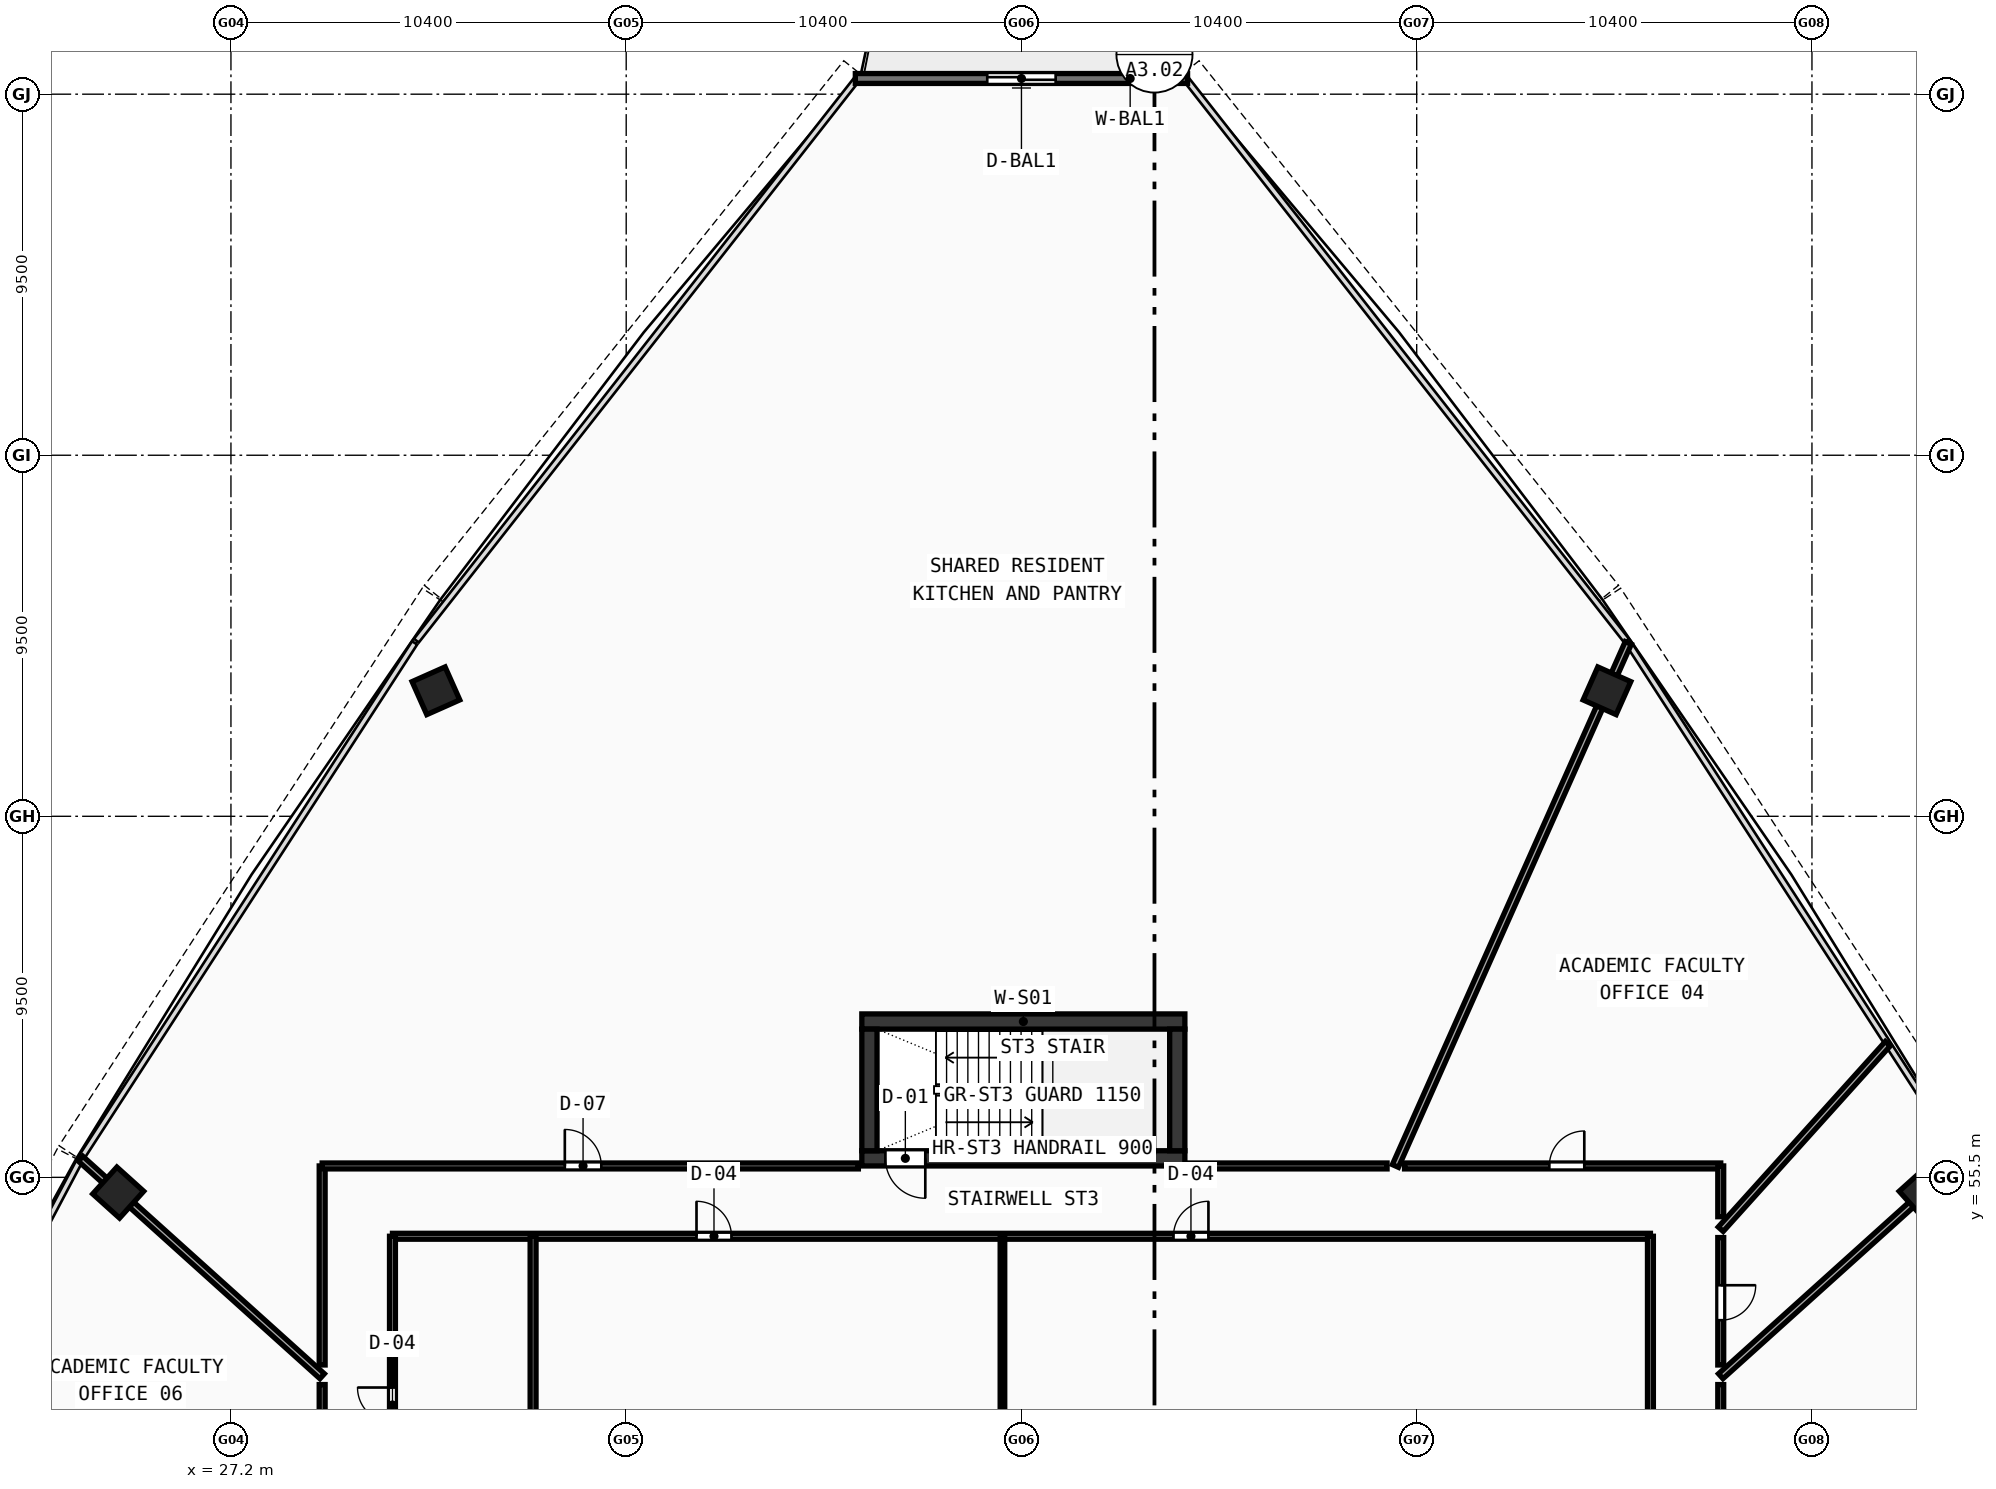
"""IFC4 building model, lengths in metres.
Left out: names, types, materials, properties, quantities, classifications, styles, units other than length and angle.
Written with IfcOpenShell. Run it as: python <this file> out.ifc"""

import sys

from ifc_helpers import new_model, si_unit, direction, frame, frame_2d, origin, origin_with_axes, origin_2d, place, context, subcontext, project, spatial, rectangle, hollow_rectangle, extrude, source, transform, mapped, element, fill, save


model = new_model("IFC4")
c1 = context("Model", 3, precision=1e-05, world=origin(), true_north=direction((0.0, 1.0)))
c2 = subcontext(c1, "Body", "Model", "MODEL_VIEW")
j1 = project(units=[si_unit("LENGTHUNIT", "METRE"), si_unit("PLANEANGLEUNIT", "RADIAN")], contexts=[c1])
p1 = place(None, origin())
s1 = spatial("IfcSite", under=j1, at=p1, CompositionType="ELEMENT")
p2 = place(p1, origin())
s2 = spatial("IfcBuilding", under=s1, at=p2, CompositionType="ELEMENT")
p3 = place(p2, frame((0.0, 0.0, 151.91)))
s3 = spatial("IfcBuildingStorey", under=s2, at=p3, CompositionType="ELEMENT", Elevation=151.91)
p4 = place(p3, frame((43.8, 59.6, 0.0), z_axis=(0.0, 0.0, 1.0), x_axis=(1.0, 0.0, 0.0)))
e1 = element("IfcWall", 1, at=p4, inside=s3, PredefinedType="SHEAR", context=c2, shape_type="SweptSolid", body=[
    extrude(rectangle(XDim=8.5, YDim=0.4, at=frame_2d((4.25, 0.0))), origin(), (0.0, 0.0, 1.0), 3.42),
])
p5 = place(p3, frame((43.8, 56.0, 0.0), z_axis=(0.0, 0.0, 1.0), x_axis=(1.0, 0.0, 0.0)))
e2 = element("IfcWall", 2, at=p5, inside=s3, PredefinedType="SHEAR", context=c2, shape_type="SweptSolid", body=[
    extrude(rectangle(XDim=8.5, YDim=0.4, at=frame_2d((4.25, 0.0))), origin(), (0.0, 0.0, 1.0), 3.42),
])
p6 = place(p5, frame((0.62, 0.0, 0.0)))
e3 = element("IfcOpeningElement", 3, at=p6, cuts=e2, PredefinedType="OPENING", context=c2, shape_type="SweptSolid", body=[
    extrude(rectangle(XDim=1.05, YDim=2.1, at=frame_2d((0.525, 1.05))), frame((0.0, 0.21, 0.0), z_axis=(0.0, -1.0, 0.0), x_axis=(1.0, 0.0, 0.0)), (0.0, 0.0, 1.0), 0.42),
])
for number, where, z_axis, x_axis in (
    (4, (44.0, 56.2, 0.0), (0.0, 0.0, 1.0), (0.0, 1.0, 0.0)),
    (5, (52.1, 56.2, 0.0), (0.0, 0.0, 1.0), (0.0, 1.0, 0.0)),
):
    element("IfcWall", number, at=place(p3, frame(where, z_axis=z_axis, x_axis=x_axis)), inside=s3, PredefinedType="SHEAR", context=c2, shape_type="SweptSolid", body=[
        extrude(rectangle(XDim=3.2, YDim=0.4, at=frame_2d((1.6, 0.0))), origin(), (0.0, 0.0, 1.0), 3.42),
    ])
m1 = source(origin(), c2, "Body", "SweptSolid", [
    extrude(hollow_rectangle(XDim=0.95, YDim=0.95, WallThickness=0.04, at=origin_2d()), origin(), (0.0, 0.0, 1.0), 3.68),
])
for number, where, z_axis, x_axis in (
    (6, (71.766, 55.099, -0.26), (0.0, 0.0, 1.0), (-0.669, 0.743, 0.0)),
    (7, (63.406, 68.303, -0.26), (0.0, 0.0, 1.0), (-0.914, 0.407, 0.0)),
    (8, (32.594, 68.303, -0.26), (0.0, 0.0, 1.0), (-0.914, -0.407, 0.0)),
    (9, (24.234, 55.099, -0.26), (0.0, 0.0, 1.0), (-0.669, -0.743, 0.0)),
):
    element("IfcColumn", number, at=place(p3, frame(where, z_axis=z_axis, x_axis=x_axis)), inside=s3, PredefinedType="COLUMN", context=c2, shape_type="MappedRepresentation", body=[
        mapped(m1, transform((0.0, 0.0, 0.0), scale=1.0)),
    ])
p7 = place(p3, frame((52.371, 84.413, 0.0), z_axis=(0.0, 0.0, 1.0), x_axis=(-1.0, 0.0, 0.0)))
e10 = element("IfcWall", 10, at=p7, inside=s3, PredefinedType="STANDARD", context=c2, shape_type="SweptSolid", body=[
    extrude(rectangle(XDim=8.742, YDim=0.26, at=frame_2d((4.371, 0.0))), origin(), (0.0, 0.0, 1.0), 3.42),
])
p8 = place(p7, frame((3.471, 0.0, 0.0)))
e11 = element("IfcOpeningElement", 11, at=p8, cuts=e10, PredefinedType="OPENING", context=c2, shape_type="SweptSolid", body=[
    extrude(rectangle(XDim=1.8, YDim=2.15, at=frame_2d((0.9, 1.075))), frame((0.0, 0.14, 0.0), z_axis=(0.0, -1.0, 0.0), x_axis=(1.0, 0.0, 0.0)), (0.0, 0.0, 1.0), 0.28),
])
p9 = place(p3, frame((31.45, 53.95, 0.0), z_axis=(0.0, 0.0, 1.0), x_axis=(1.0, 0.0, 0.0)))
e12 = element("IfcWall", 12, at=p9, inside=s3, PredefinedType="PARTITIONING", context=c2, shape_type="SweptSolid", body=[
    extrude(rectangle(XDim=33.1, YDim=0.155, at=frame_2d((16.55, 0.0))), origin(), (0.0, 0.0, 1.0), 2.77),
])
p10 = place(p9, frame((8.0, 0.0, 0.0)))
e13 = element("IfcOpeningElement", 13, at=p10, cuts=e12, PredefinedType="OPENING", context=c2, shape_type="SweptSolid", body=[
    extrude(rectangle(XDim=0.92, YDim=2.1, at=frame_2d((0.46, 1.05))), frame((0.0, 0.087, 0.0), z_axis=(0.0, -1.0, 0.0), x_axis=(1.0, 0.0, 0.0)), (0.0, 0.0, 1.0), 0.175),
])
p11 = place(p9, frame((20.55, 0.0, 0.0)))
e14 = element("IfcOpeningElement", 14, at=p11, cuts=e12, PredefinedType="OPENING", context=c2, shape_type="SweptSolid", body=[
    extrude(rectangle(XDim=0.92, YDim=2.1, at=frame_2d((0.46, 1.05))), frame((0.0, 0.087, 0.0), z_axis=(0.0, -1.0, 0.0), x_axis=(1.0, 0.0, 0.0)), (0.0, 0.0, 1.0), 0.175),
])
p12 = place(p3, frame((31.45, 42.25, 0.0), z_axis=(0.0, 0.0, 1.0), x_axis=(0.0, 1.0, 0.0)))
e15 = element("IfcWall", 15, at=p12, inside=s3, PredefinedType="PARTITIONING", context=c2, shape_type="SweptSolid", body=[
    extrude(rectangle(XDim=11.7, YDim=0.155, at=frame_2d((5.85, 0.0))), origin(), (0.0, 0.0, 1.0), 2.77),
])
p13 = place(p12, frame((1.4, 0.0, 0.0)))
e16 = element("IfcOpeningElement", 16, at=p13, cuts=e15, PredefinedType="OPENING", context=c2, shape_type="SweptSolid", body=[
    extrude(rectangle(XDim=0.94, YDim=2.1, at=frame_2d((0.47, 1.05))), frame((0.0, 0.087, 0.0), z_axis=(0.0, -1.0, 0.0), x_axis=(1.0, 0.0, 0.0)), (0.0, 0.0, 1.0), 0.175),
])
p14 = place(p12, frame((6.8, 0.0, 0.0)))
e17 = element("IfcOpeningElement", 17, at=p14, cuts=e15, PredefinedType="OPENING", context=c2, shape_type="SweptSolid", body=[
    extrude(rectangle(XDim=0.92, YDim=2.1, at=frame_2d((0.46, 1.05))), frame((0.0, 0.087, 0.0), z_axis=(0.0, -1.0, 0.0), x_axis=(1.0, 0.0, 0.0)), (0.0, 0.0, 1.0), 0.175),
])
for number, where, z_axis, x_axis in (
    (18, (64.55, 42.25, 0.0), (0.0, 0.0, 1.0), (0.0, 1.0, 0.0)),
    (19, (35.15, 42.25, 0.0), (0.0, 0.0, 1.0), (0.0, 1.0, 0.0)),
):
    element("IfcWall", number, at=place(p3, frame(where, z_axis=z_axis, x_axis=x_axis)), inside=s3, PredefinedType="PARTITIONING", context=c2, shape_type="SweptSolid", body=[
        extrude(rectangle(XDim=11.7, YDim=0.155, at=frame_2d((5.85, 0.0))), origin(), (0.0, 0.0, 1.0), 2.77),
    ])
p15 = place(p3, frame((47.5, 42.25, 0.0), z_axis=(0.0, 0.0, 1.0), x_axis=(0.0, 1.0, 0.0)))
e20 = element("IfcWall", 20, at=p15, inside=s3, PredefinedType="PARTITIONING", context=c2, shape_type="SweptSolid", body=[
    extrude(rectangle(XDim=11.7, YDim=0.12, at=frame_2d((5.85, 0.0))), origin(), (0.0, 0.0, 1.0), 3.02),
])
p16 = place(p3, frame((66.4, 50.267, 0.0), z_axis=(0.0, 0.0, 1.0), x_axis=(0.743147926867, 0.669127161901, 0.0)))
e21 = element("IfcWall", 21, at=p16, inside=s3, PredefinedType="PARTITIONING", context=c2, shape_type="SweptSolid", body=[
    extrude(rectangle(XDim=8.552, YDim=0.175, at=frame_2d((4.276, 0.0))), origin(), (0.0, 0.0, 1.0), 2.77),
])
p17 = place(p3, frame((66.4, 54.135, 0.0), z_axis=(0.0, 0.0, 1.0), x_axis=(0.669139250318, 0.74313704233, 0.0)))
e22 = element("IfcWall", 22, at=p17, inside=s3, PredefinedType="PARTITIONING", context=c2, shape_type="SweptSolid", body=[
    extrude(rectangle(XDim=6.569, YDim=0.175, at=frame_2d((3.284, 0.0))), origin(), (0.0, 0.0, 1.0), 2.77),
])
p18 = place(p3, frame((57.84, 55.8, 0.0), z_axis=(0.0, 0.0, 1.0), x_axis=(0.406736829456, 0.913545374661, 0.0)))
e23 = element("IfcWall", 23, at=p18, inside=s3, PredefinedType="PARTITIONING", context=c2, shape_type="SweptSolid", body=[
    extrude(rectangle(XDim=15.065, YDim=0.175, at=frame_2d((7.532, 0.0))), origin(), (0.0, 0.0, 1.0), 2.77),
])
p19 = place(p3, frame((29.6, 50.267, 0.0), z_axis=(0.0, 0.0, 1.0), x_axis=(-0.743147926867, 0.669127161901, 0.0)))
e24 = element("IfcWall", 24, at=p19, inside=s3, PredefinedType="PARTITIONING", context=c2, shape_type="SweptSolid", body=[
    extrude(rectangle(XDim=8.552, YDim=0.175, at=frame_2d((4.276, 0.0))), origin(), (0.0, 0.0, 1.0), 2.77),
])
p20 = place(p3, frame((29.6, 43.733, 0.0), z_axis=(0.0, 0.0, 1.0), x_axis=(0.0, 1.0, 0.0)))
e25 = element("IfcWall", 25, at=p20, inside=s3, PredefinedType="PARTITIONING", context=c2, shape_type="SweptSolid", body=[
    extrude(rectangle(XDim=6.315, YDim=0.155, at=frame_2d((3.157, 0.0))), origin(), (0.0, 0.0, 1.0), 2.77),
])
p21 = place(p20, frame((2.683, 0.0, 0.0)))
e26 = element("IfcOpeningElement", 26, at=p21, cuts=e25, PredefinedType="OPENING", context=c2, shape_type="SweptSolid", body=[
    extrude(rectangle(XDim=0.92, YDim=2.1, at=frame_2d((0.46, 1.05))), frame((0.0, 0.087, 0.0), z_axis=(0.0, -1.0, 0.0), x_axis=(1.0, 0.0, 0.0)), (0.0, 0.0, 1.0), 0.175),
])
p22 = place(p3, frame((29.6, 50.563, 0.0), z_axis=(0.0, 0.0, 1.0), x_axis=(0.0, 1.0, 0.0)))
e27 = element("IfcWall", 27, at=p22, inside=s3, PredefinedType="PARTITIONING", context=c2, shape_type="SweptSolid", body=[
    extrude(rectangle(XDim=5.237, YDim=0.155, at=frame_2d((2.618, 0.0))), origin(), (0.0, 0.0, 1.0), 3.02),
])
p23 = place(p3, frame((29.6, 55.8, 0.0), z_axis=(0.0, 0.0, 1.0), x_axis=(1.0, 0.0, 0.0)))
e28 = element("IfcWall", 28, at=p23, inside=s3, PredefinedType="PARTITIONING", context=c2, shape_type="SweptSolid", body=[
    extrude(rectangle(XDim=14.109, YDim=0.155, at=frame_2d((7.054, 0.0))), origin(), (0.0, 0.0, 1.0), 2.77),
])
p24 = place(p23, frame((6.385, 0.0, 0.0)))
e29 = element("IfcOpeningElement", 29, at=p24, cuts=e28, PredefinedType="OPENING", context=c2, shape_type="SweptSolid", body=[
    extrude(rectangle(XDim=0.96, YDim=2.12, at=frame_2d((0.48, 1.06))), frame((0.0, 0.087, 0.0), z_axis=(0.0, -1.0, 0.0), x_axis=(1.0, 0.0, 0.0)), (0.0, 0.0, 1.0), 0.175),
])
p25 = place(p3, frame((52.391, 55.8, 0.0), z_axis=(0.0, 0.0, 1.0), x_axis=(1.0, 0.0, 0.0)))
e30 = element("IfcWall", 30, at=p25, inside=s3, PredefinedType="PARTITIONING", context=c2, shape_type="SweptSolid", body=[
    extrude(rectangle(XDim=5.229, YDim=0.155, at=frame_2d((2.614, 0.0))), origin(), (0.0, 0.0, 1.0), 2.77),
])
p26 = place(p3, frame((58.08, 55.8, 0.0), z_axis=(0.0, 0.0, 1.0), x_axis=(1.0, 0.0, 0.0)))
e31 = element("IfcWall", 31, at=p26, inside=s3, PredefinedType="PARTITIONING", context=c2, shape_type="SweptSolid", body=[
    extrude(rectangle(XDim=8.32, YDim=0.155, at=frame_2d((4.16, 0.0))), origin(), (0.0, 0.0, 1.0), 3.02),
])
p27 = place(p26, frame((3.809, 0.0, 0.0)))
e32 = element("IfcOpeningElement", 32, at=p27, cuts=e31, PredefinedType="OPENING", context=c2, shape_type="SweptSolid", body=[
    extrude(rectangle(XDim=0.92, YDim=2.1, at=frame_2d((0.46, 1.05))), frame((0.0, 0.087, 0.0), z_axis=(0.0, -1.0, 0.0), x_axis=(1.0, 0.0, 0.0)), (0.0, 0.0, 1.0), 0.175),
])
p28 = place(p3, frame((66.4, 55.8, 0.0), z_axis=(0.0, 0.0, 1.0), x_axis=(0.0, -1.0, 0.0)))
e33 = element("IfcWall", 33, at=p28, inside=s3, PredefinedType="PARTITIONING", context=c2, shape_type="SweptSolid", body=[
    extrude(rectangle(XDim=1.336, YDim=0.155, at=frame_2d((0.668, 0.0))), origin(), (0.0, 0.0, 1.0), 3.42),
])
p29 = place(p3, frame((66.4, 53.916, 0.0), z_axis=(0.0, 0.0, 1.0), x_axis=(0.0, -1.0, 0.0)))
e34 = element("IfcWall", 34, at=p29, inside=s3, PredefinedType="PARTITIONING", context=c2, shape_type="SweptSolid", body=[
    extrude(rectangle(XDim=3.352, YDim=0.155, at=frame_2d((1.676, 0.0))), origin(), (0.0, 0.0, 1.0), 3.02),
])
p30 = place(p29, frame((1.254, 0.0, 0.0)))
e35 = element("IfcOpeningElement", 35, at=p30, cuts=e34, PredefinedType="OPENING", context=c2, shape_type="SweptSolid", body=[
    extrude(rectangle(XDim=0.92, YDim=2.1, at=frame_2d((0.46, 1.05))), frame((0.0, 0.087, 0.0), z_axis=(0.0, -1.0, 0.0), x_axis=(1.0, 0.0, 0.0)), (0.0, 0.0, 1.0), 0.175),
])
p31 = place(p3, frame((66.4, 50.048, 0.0), z_axis=(0.0, 0.0, 1.0), x_axis=(0.0, -1.0, 0.0)))
e36 = element("IfcWall", 36, at=p31, inside=s3, PredefinedType="PARTITIONING", context=c2, shape_type="SweptSolid", body=[
    extrude(rectangle(XDim=10.138, YDim=0.155, at=frame_2d((5.069, 0.0))), origin(), (0.0, 0.0, 1.0), 2.77),
])
p32 = place(p31, frame((4.615, 0.0, 0.0)))
e37 = element("IfcOpeningElement", 37, at=p32, cuts=e36, PredefinedType="OPENING", context=c2, shape_type="SweptSolid", body=[
    extrude(rectangle(XDim=0.92, YDim=2.1, at=frame_2d((0.46, 1.05))), frame((0.0, 0.087, 0.0), z_axis=(0.0, -1.0, 0.0), x_axis=(1.0, 0.0, 0.0)), (0.0, 0.0, 1.0), 0.175),
])
m2 = source(origin(), c2, "Body", "SweptSolid", [
    extrude(rectangle(XDim=1.8, YDim=2.15, at=frame_2d((0.9, 1.075))), frame((0.0, 0.025, 0.0), z_axis=(0.0, -1.0, 0.0), x_axis=(1.0, 0.0, 0.0)), (0.0, 0.0, 1.0), 0.05),
])
p33 = place(p8, origin_with_axes())
e38 = element("IfcDoor", 38, at=p33, inside=s3, OperationType="DOUBLE_DOOR_SLIDING", PredefinedType="DOOR", context=c2, shape_type="MappedRepresentation", body=[
    mapped(m2, transform((0.0, 0.0, 0.0), scale=1.0)),
])
fill(e11, e38)
m3 = source(origin(), c2, "Body", "SweptSolid", [
    extrude(rectangle(XDim=1.05, YDim=2.1, at=frame_2d((0.525, 1.05))), frame((0.0, 0.025, 0.0), z_axis=(0.0, -1.0, 0.0), x_axis=(1.0, 0.0, 0.0)), (0.0, 0.0, 1.0), 0.05),
])
p34 = place(p6, frame((1.05, 0.0, 0.0), z_axis=(0.0, 0.0, 1.0), x_axis=(-1.0, 0.0, 0.0)))
e39 = element("IfcDoor", 39, at=p34, inside=s3, OperationType="SINGLE_SWING_LEFT", PredefinedType="DOOR", context=c2, shape_type="MappedRepresentation", body=[
    mapped(m3, transform((0.0, 0.0, 0.0), scale=1.0)),
])
fill(e3, e39)
m4 = source(origin(), c2, "Body", "SweptSolid", [
    extrude(rectangle(XDim=0.92, YDim=2.1, at=frame_2d((0.46, 1.05))), frame((0.0, 0.025, 0.0), z_axis=(0.0, -1.0, 0.0), x_axis=(1.0, 0.0, 0.0)), (0.0, 0.0, 1.0), 0.05),
])
p35 = place(p14, origin_with_axes())
e40 = element("IfcDoor", 40, at=p35, inside=s3, OperationType="SINGLE_SWING_RIGHT", PredefinedType="DOOR", context=c2, shape_type="MappedRepresentation", body=[
    mapped(m4, transform((0.0, 0.0, 0.0), scale=1.0)),
])
fill(e17, e40)
p36 = place(p10, origin_with_axes())
e41 = element("IfcDoor", 41, at=p36, inside=s3, OperationType="SINGLE_SWING_LEFT", PredefinedType="DOOR", context=c2, shape_type="MappedRepresentation", body=[
    mapped(m4, transform((0.0, 0.0, 0.0), scale=1.0)),
])
fill(e13, e41)
p37 = place(p11, origin_with_axes())
e42 = element("IfcDoor", 42, at=p37, inside=s3, OperationType="SINGLE_SWING_RIGHT", PredefinedType="DOOR", context=c2, shape_type="MappedRepresentation", body=[
    mapped(m4, transform((0.0, 0.0, 0.0), scale=1.0)),
])
fill(e14, e42)
p38 = place(p30, origin_with_axes())
e43 = element("IfcDoor", 43, at=p38, inside=s3, OperationType="SINGLE_SWING_LEFT", PredefinedType="DOOR", context=c2, shape_type="MappedRepresentation", body=[
    mapped(m4, transform((0.0, 0.0, 0.0), scale=1.0)),
])
fill(e35, e43)
p39 = place(p27, origin_with_axes())
e44 = element("IfcDoor", 44, at=p39, inside=s3, OperationType="SINGLE_SWING_RIGHT", PredefinedType="DOOR", context=c2, shape_type="MappedRepresentation", body=[
    mapped(m4, transform((0.0, 0.0, 0.0), scale=1.0)),
])
fill(e32, e44)
m5 = source(origin(), c2, "Body", "SweptSolid", [
    extrude(rectangle(XDim=0.96, YDim=2.12, at=frame_2d((0.48, 1.06))), frame((0.0, 0.025, 0.0), z_axis=(0.0, -1.0, 0.0), x_axis=(1.0, 0.0, 0.0)), (0.0, 0.0, 1.0), 0.05),
])
p40 = place(p24, origin_with_axes())
e45 = element("IfcDoor", 45, at=p40, inside=s3, OperationType="SINGLE_SWING_LEFT", PredefinedType="DOOR", context=c2, shape_type="MappedRepresentation", body=[
    mapped(m5, transform((0.0, 0.0, 0.0), scale=1.0)),
])
fill(e29, e45)
save(model, sys.argv[1])
